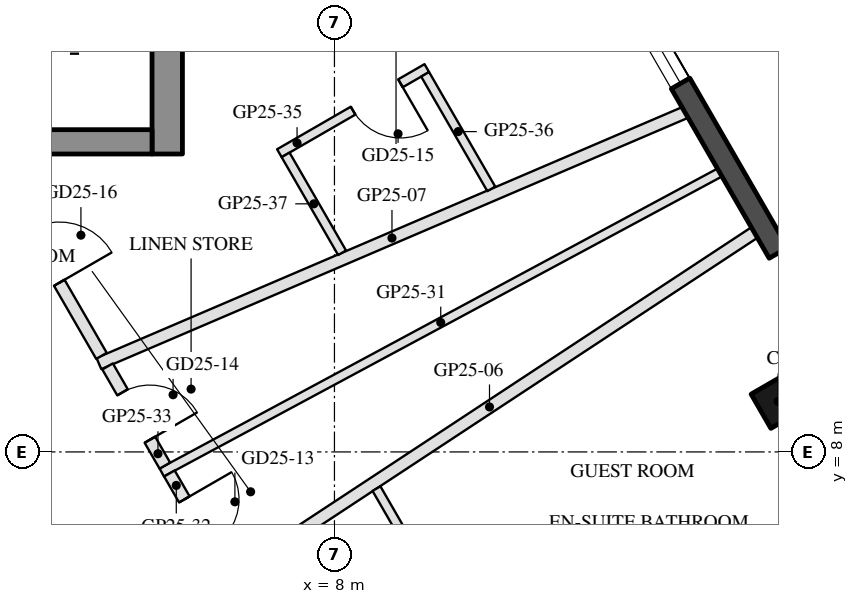
"""IFC4 building model, lengths in metres.
Left out: names, types, materials, properties, quantities, classifications, styles, units other than length and angle.
Written with IfcOpenShell. Run it as: python <this file> out.ifc"""

import sys

from ifc_helpers import new_model, si_unit, direction, frame, frame_2d, origin, origin_2d, place, context, subcontext, project, spatial, rectangle, hollow_rectangle, extrude, boolean, halfspace, element, fill, save


model = new_model("IFC4")
c1 = context("Model", 3, precision=1e-05, world=origin(), true_north=direction((0.0, 1.0)))
c2 = subcontext(c1, "Body", "Model", "MODEL_VIEW")
j1 = project(units=[si_unit("LENGTHUNIT", "METRE"), si_unit("PLANEANGLEUNIT", "RADIAN")], contexts=[c1])
p1 = place(None, origin())
s1 = spatial("IfcSite", under=j1, at=p1, CompositionType="ELEMENT")
p2 = place(p1, origin())
s2 = spatial("IfcBuilding", under=s1, at=p2, CompositionType="ELEMENT")
p3 = place(p2, frame((0.0, 0.0, 261.5)))
s3 = spatial("IfcBuildingStorey", under=s2, at=p3, CompositionType="ELEMENT", Elevation=261.5)
p4 = place(p3, frame((15.296, 8.832, 0.0), z_axis=(0.0, 0.0, 1.0), x_axis=(-0.5, 0.866025403784, 0.0)))
e1 = element("IfcColumn", 1, at=p4, inside=s3, PredefinedType="COLUMN", context=c2, shape_type="SweptSolid", body=[
    boolean("DIFFERENCE", extrude(hollow_rectangle(XDim=0.65, YDim=0.65, WallThickness=0.03, at=origin_2d()), origin(), (0.0, 0.0, 1.0), 3.7), halfspace(frame((0.0, 0.0, 3.663), z_axis=(0.0, 0.0, 1.0), x_axis=(1.0, 0.0, 0.0)), False)),
])
p5 = place(p3, frame((16.807, 8.665, 0.0), z_axis=(0.0, 0.0, 1.0), x_axis=(-0.499992427901, 0.866029775494, 0.0)))
e2 = element("IfcWall", 2, at=p5, inside=s3, PredefinedType="SOLIDWALL", context=c2, shape_type="SweptSolid", body=[
    extrude(rectangle(XDim=9.472, YDim=0.35, at=frame_2d((4.736, 0.0))), origin(), (0.0, 0.0, 1.0), 3.55),
])
p6 = place(p5, frame((1.612, 0.0, 0.0)))
e3 = element("IfcOpeningElement", 3, at=p6, cuts=e2, PredefinedType="OPENING", context=c2, shape_type="SweptSolid", body=[
    extrude(rectangle(XDim=1.4, YDim=2.4, at=frame_2d((0.7, 1.2))), frame((0.0, 0.185, 0.0), z_axis=(0.0, -1.0, 0.0), x_axis=(1.0, 0.0, 0.0)), (0.0, 0.0, 1.0), 0.37),
])
p7 = place(p5, frame((6.23, 0.0, 0.3)))
e4 = element("IfcOpeningElement", 4, at=p7, cuts=e2, PredefinedType="OPENING", context=c2, shape_type="SweptSolid", body=[
    extrude(rectangle(XDim=1.6, YDim=2.65, at=frame_2d((0.8, 1.325))), frame((0.0, 0.185, 0.0), z_axis=(0.0, -1.0, 0.0), x_axis=(1.0, 0.0, 0.0)), (0.0, 0.0, 1.0), 0.37),
])
p8 = place(p3, frame((5.25, 12.9, 0.0), z_axis=(0.0, 0.0, 1.0), x_axis=(0.0, 1.0, 0.0)))
e5 = element("IfcWall", 5, at=p8, inside=s3, PredefinedType="SHEAR", context=c2, shape_type="SweptSolid", body=[
    extrude(rectangle(XDim=13.934, YDim=0.5, at=frame_2d((6.967, 0.0))), origin(), (0.0, 0.0, 1.0), 3.5),
])
p9 = place(p3, frame((5.0, 13.1, 0.0), z_axis=(0.0, 0.0, 1.0), x_axis=(-1.0, 0.0, 0.0)))
e6 = element("IfcWall", 6, at=p9, inside=s3, PredefinedType="SHEAR", context=c2, shape_type="SweptSolid", body=[
    extrude(rectangle(XDim=10.0, YDim=0.4, at=frame_2d((5.0, 0.0))), origin(), (0.0, 0.0, 1.0), 3.5),
])
p10 = place(p9, frame((3.55, 0.0, 0.0)))
e7 = element("IfcOpeningElement", 7, at=p10, cuts=e6, PredefinedType="OPENING", context=c2, shape_type="SweptSolid", body=[
    extrude(rectangle(XDim=1.1, YDim=2.1, at=frame_2d((0.55, 1.05))), frame((0.0, 0.21, 0.0), z_axis=(0.0, -1.0, 0.0), x_axis=(1.0, 0.0, 0.0)), (0.0, 0.0, 1.0), 0.42),
])
p11 = place(p9, frame((5.85, 0.0, 0.0)))
e8 = element("IfcOpeningElement", 8, at=p11, cuts=e6, PredefinedType="OPENING", context=c2, shape_type="SweptSolid", body=[
    extrude(rectangle(XDim=1.4, YDim=2.1, at=frame_2d((0.7, 1.05))), frame((0.0, 0.21, 0.0), z_axis=(0.0, -1.0, 0.0), x_axis=(1.0, 0.0, 0.0)), (0.0, 0.0, 1.0), 0.42),
])
p12 = place(p3, frame((16.427, 7.174, 0.0), z_axis=(0.0, 0.0, 1.0), x_axis=(-0.866033014143, -0.499986818241, 0.0)))
e9 = element("IfcWall", 9, at=p12, inside=s3, PredefinedType="PARTITIONING", context=c2, shape_type="SweptSolid", body=[
    extrude(rectangle(XDim=9.513, YDim=0.2, at=frame_2d((4.756, 0.0))), origin(), (0.0, 0.0, 1.0), 3.1),
])
p13 = place(p3, frame((14.906, 11.608, 0.0), z_axis=(0.0, 0.0, 1.0), x_axis=(-0.835212554653, -0.549927257507, 0.0)))
e10 = element("IfcWall", 10, at=p13, inside=s3, PredefinedType="PARTITIONING", context=c2, shape_type="SweptSolid", body=[
    extrude(rectangle(XDim=10.431, YDim=0.2, at=frame_2d((5.216, 0.0))), origin(), (0.0, 0.0, 1.0), 3.1),
])
p14 = place(p3, frame((13.766, 13.583, 0.0), z_axis=(0.0, 0.0, 1.0), x_axis=(-0.919210042537, -0.393767568115, 0.0)))
e11 = element("IfcWall", 11, at=p14, inside=s3, PredefinedType="PARTITIONING", context=c2, shape_type="SweptSolid", body=[
    extrude(rectangle(XDim=10.487, YDim=0.2, at=frame_2d((5.243, 0.0))), origin(), (0.0, 0.0, 1.0), 3.1),
])
p15 = place(p3, frame((9.693, 5.661, 0.0), z_axis=(0.0, 0.0, 1.0), x_axis=(-0.499964999879, 0.866045610171, 0.0)))
e12 = element("IfcWall", 12, at=p15, inside=s3, PredefinedType="PARTITIONING", context=c2, shape_type="SweptSolid", body=[
    extrude(rectangle(XDim=2.004, YDim=0.15, at=frame_2d((1.002, 0.0))), origin(), (0.0, 0.0, 1.0), 3.0),
])
p16 = place(p3, frame((14.336, 12.595, 0.0), z_axis=(0.0, 0.0, 1.0), x_axis=(-0.880794466183, -0.473498794445, 0.0)))
e13 = element("IfcWall", 13, at=p16, inside=s3, PredefinedType="PARTITIONING", context=c2, shape_type="SweptSolid", body=[
    extrude(rectangle(XDim=10.418, YDim=0.15, at=frame_2d((5.209, 0.0))), origin(), (0.0, 0.0, 1.0), 3.0),
])
p17 = place(p3, frame((5.286, 7.645, 0.0), z_axis=(0.0, 0.0, 1.0), x_axis=(0.500014143148, -0.86601723808, 0.0)))
e14 = element("IfcWall", 14, at=p17, inside=s3, PredefinedType="PARTITIONING", context=c2, shape_type="SweptSolid", body=[
    extrude(rectangle(XDim=1.884, YDim=0.2, at=frame_2d((0.942, 0.0))), origin(), (0.0, 0.0, 1.0), 3.0),
])
p18 = place(p17, frame((0.492, 0.0, 0.0)))
e15 = element("IfcOpeningElement", 15, at=p18, cuts=e14, PredefinedType="OPENING", context=c2, shape_type="SweptSolid", body=[
    extrude(rectangle(XDim=0.9, YDim=2.1, at=frame_2d((0.45, 1.05))), frame((0.0, 0.11, 0.0), z_axis=(0.0, -1.0, 0.0), x_axis=(1.0, 0.0, 0.0)), (0.0, 0.0, 1.0), 0.22),
])
p19 = place(p3, frame((4.269, 9.406, 0.0), z_axis=(0.0, 0.0, 1.0), x_axis=(0.499973055223, -0.8660409598, 0.0)))
e16 = element("IfcWall", 16, at=p19, inside=s3, PredefinedType="PARTITIONING", context=c2, shape_type="SweptSolid", body=[
    extrude(rectangle(XDim=1.883, YDim=0.2, at=frame_2d((0.942, 0.0))), origin(), (0.0, 0.0, 1.0), 3.55),
])
p20 = place(p19, frame((0.492, 0.0, 0.0)))
e17 = element("IfcOpeningElement", 17, at=p20, cuts=e16, PredefinedType="OPENING", context=c2, shape_type="SweptSolid", body=[
    extrude(rectangle(XDim=0.9, YDim=2.1, at=frame_2d((0.45, 1.05))), frame((0.0, 0.11, 0.0), z_axis=(0.0, -1.0, 0.0), x_axis=(1.0, 0.0, 0.0)), (0.0, 0.0, 1.0), 0.22),
])
p21 = place(p3, frame((2.281, 12.85, 0.0), z_axis=(0.0, 0.0, 1.0), x_axis=(0.499978071388, -0.866038063904, 0.0)))
e18 = element("IfcWall", 18, at=p21, inside=s3, PredefinedType="PARTITIONING", context=c2, shape_type="SweptSolid", body=[
    extrude(rectangle(XDim=3.776, YDim=0.2, at=frame_2d((1.888, 0.0))), origin(), (0.0, 0.0, 1.0), 3.0),
])
p22 = place(p21, frame((1.388, 0.0, 0.0)))
e19 = element("IfcOpeningElement", 19, at=p22, cuts=e18, PredefinedType="OPENING", context=c2, shape_type="SweptSolid", body=[
    extrude(rectangle(XDim=1.0, YDim=2.1, at=frame_2d((0.5, 1.05))), frame((0.0, 0.11, 0.0), z_axis=(0.0, -1.0, 0.0), x_axis=(1.0, 0.0, 0.0)), (0.0, 0.0, 1.0), 0.22),
])
p23 = place(p3, frame((9.519, 14.313, 0.0), z_axis=(0.0, 0.0, 1.0), x_axis=(-0.865996816683, -0.500049511043, 0.0)))
e20 = element("IfcWall", 20, at=p23, inside=s3, PredefinedType="PARTITIONING", context=c2, shape_type="SweptSolid", body=[
    extrude(rectangle(XDim=2.8, YDim=0.15, at=frame_2d((1.4, 0.0))), origin(), (0.0, 0.0, 1.0), 3.0),
])
p24 = place(p23, frame((0.5, 0.0, 0.0)))
e21 = element("IfcOpeningElement", 21, at=p24, cuts=e20, PredefinedType="OPENING", context=c2, shape_type="SweptSolid", body=[
    extrude(rectangle(XDim=0.9, YDim=2.1, at=frame_2d((0.45, 1.05))), frame((0.0, 0.085, 0.0), z_axis=(0.0, -1.0, 0.0), x_axis=(1.0, 0.0, 0.0)), (0.0, 0.0, 1.0), 0.17),
])
p25 = place(p3, frame((10.579, 12.326, 0.0), z_axis=(0.0, 0.0, 1.0), x_axis=(-0.499965319569, 0.866045425615, 0.0)))
e22 = element("IfcWall", 22, at=p25, inside=s3, PredefinedType="PARTITIONING", context=c2, shape_type="SweptSolid", body=[
    extrude(rectangle(XDim=2.176, YDim=0.15, at=frame_2d((1.088, 0.0))), origin(), (0.0, 0.0, 1.0), 3.55),
])
p26 = place(p3, frame((8.126, 11.276, 0.0), z_axis=(0.0, 0.0, 1.0), x_axis=(-0.500093796661, 0.865971243484, 0.0)))
e23 = element("IfcWall", 23, at=p26, inside=s3, PredefinedType="PARTITIONING", context=c2, shape_type="SweptSolid", body=[
    extrude(rectangle(XDim=1.859, YDim=0.15, at=frame_2d((0.93, 0.0))), origin(), (0.0, 0.0, 1.0), 3.55),
])
p27 = place(p6, frame((1.4, 0.0, 0.0), z_axis=(0.0, 0.0, 1.0), x_axis=(-1.0, 0.0, 0.0)))
e24 = element("IfcDoor", 24, at=p27, inside=s3, OperationType="SLIDING_TO_LEFT", PredefinedType="DOOR", context=c2, shape_type="SweptSolid", body=[
    extrude(rectangle(XDim=1.4, YDim=2.4, at=frame_2d((0.7, 1.2))), frame((0.0, 0.025, 0.0), z_axis=(0.0, -1.0, 0.0), x_axis=(1.0, 0.0, 0.0)), (0.0, 0.0, 1.0), 0.05),
])
fill(e3, e24)
p28 = place(p7, origin())
e25 = element("IfcWindow", 25, at=p28, inside=s3, PartitioningType="SINGLE_PANEL", PredefinedType="WINDOW", context=c2, shape_type="SweptSolid", body=[
    extrude(rectangle(XDim=1.6, YDim=2.65, at=frame_2d((0.8, 1.325))), frame((0.0, 0.03, 0.0), z_axis=(0.0, -1.0, 0.0), x_axis=(1.0, 0.0, 0.0)), (0.0, 0.0, 1.0), 0.06),
])
fill(e4, e25)
p29 = place(p18, origin())
e26 = element("IfcDoor", 26, at=p29, inside=s3, OperationType="SINGLE_SWING_LEFT", PredefinedType="DOOR", context=c2, shape_type="SweptSolid", body=[
    extrude(rectangle(XDim=0.9, YDim=2.1, at=frame_2d((0.45, 1.05))), frame((0.0, 0.025, 0.0), z_axis=(0.0, -1.0, 0.0), x_axis=(1.0, 0.0, 0.0)), (0.0, 0.0, 1.0), 0.05),
])
fill(e15, e26)
p30 = place(p20, origin())
e27 = element("IfcDoor", 27, at=p30, inside=s3, OperationType="SINGLE_SWING_RIGHT", PredefinedType="DOOR", context=c2, shape_type="SweptSolid", body=[
    extrude(rectangle(XDim=0.9, YDim=2.1, at=frame_2d((0.45, 1.05))), frame((0.0, 0.025, 0.0), z_axis=(0.0, -1.0, 0.0), x_axis=(1.0, 0.0, 0.0)), (0.0, 0.0, 1.0), 0.05),
])
fill(e17, e27)
p31 = place(p24, origin())
e28 = element("IfcDoor", 28, at=p31, inside=s3, OperationType="SINGLE_SWING_LEFT", PredefinedType="DOOR", context=c2, shape_type="SweptSolid", body=[
    extrude(rectangle(XDim=0.9, YDim=2.1, at=frame_2d((0.45, 1.05))), frame((0.0, 0.025, 0.0), z_axis=(0.0, -1.0, 0.0), x_axis=(1.0, 0.0, 0.0)), (0.0, 0.0, 1.0), 0.05),
])
fill(e21, e28)
p32 = place(p22, origin())
e29 = element("IfcDoor", 29, at=p32, inside=s3, OperationType="SINGLE_SWING_RIGHT", PredefinedType="DOOR", context=c2, shape_type="SweptSolid", body=[
    extrude(rectangle(XDim=1.0, YDim=2.1, at=frame_2d((0.5, 1.05))), frame((0.0, 0.025, 0.0), z_axis=(0.0, -1.0, 0.0), x_axis=(1.0, 0.0, 0.0)), (0.0, 0.0, 1.0), 0.05),
])
fill(e19, e29)
save(model, sys.argv[1])
